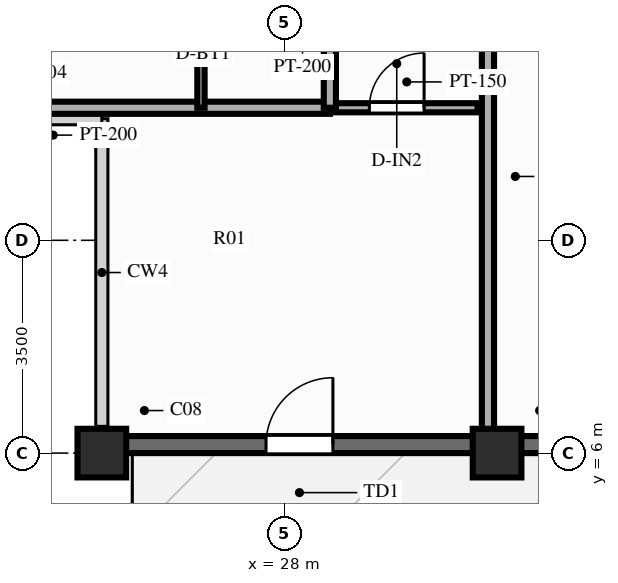
"""IFC4 building model, lengths in metres.
Left out: names, types, materials, properties, quantities, classifications, styles, units other than length and angle.
Written with IfcOpenShell. Run it as: python <this file> out.ifc"""

import sys

from ifc_helpers import new_model, si_unit, direction, frame, frame_2d, origin, origin_2d, place, context, subcontext, project, spatial, rectangle, extrude, source, transform, mapped, element, fill, save


model = new_model("IFC4")
c1 = context("Model", 3, precision=1e-05, world=origin(), true_north=direction((0.0, 1.0)))
c2 = subcontext(c1, "Body", "Model", "MODEL_VIEW")
j1 = project(units=[si_unit("LENGTHUNIT", "METRE"), si_unit("PLANEANGLEUNIT", "RADIAN")], contexts=[c1])
p1 = place(None, origin())
s1 = spatial("IfcSite", under=j1, at=p1, CompositionType="ELEMENT")
p2 = place(p1, origin())
s2 = spatial("IfcBuilding", under=s1, at=p2, CompositionType="ELEMENT")
p3 = place(p2, frame((0.0, 0.0, 196.6)))
s3 = spatial("IfcBuildingStorey", under=s2, at=p3, CompositionType="ELEMENT", Elevation=196.6)
m1 = source(origin(), c2, "Body", "SweptSolid", [
    extrude(rectangle(XDim=0.8, YDim=0.8, at=origin_2d()), origin(), (0.0, 0.0, 1.0), 3.0),
])
for number, where, z_axis, x_axis in (
    (1, (25.0, 6.0, 0.0), (0.0, 0.0, 1.0), (1.0, 0.0, 0.0)),
    (2, (31.5, 6.0, 0.0), (0.0, 0.0, 1.0), (1.0, 0.0, 0.0)),
):
    element("IfcColumn", number, at=place(p3, frame(where, z_axis=z_axis, x_axis=x_axis)), inside=s3, PredefinedType="COLUMN", context=c2, shape_type="MappedRepresentation", body=[
        mapped(m1, transform((0.0, 0.0, 0.0), scale=1.0)),
    ])
p4 = place(p3, frame((25.0, 6.14, 0.0), z_axis=(0.0, 0.0, 1.0), x_axis=(1.0, 0.0, 0.0)))
e3 = element("IfcWall", 3, at=p4, inside=s3, PredefinedType="SOLIDWALL", context=c2, shape_type="SweptSolid", body=[
    extrude(rectangle(XDim=26.0, YDim=0.28, at=frame_2d((13.0, 0.0))), origin(), (0.0, 0.0, 1.0), 2.28),
])
p5 = place(p4, frame((3.8, 0.0, 0.0), z_axis=(0.0, 0.0, 1.0), x_axis=(-1.0, 0.0, 0.0)))
e4 = element("IfcOpeningElement", 4, at=p5, cuts=e3, PredefinedType="OPENING", context=c2, shape_type="SweptSolid", body=[
    extrude(rectangle(XDim=1.1, YDim=2.15, at=frame_2d((0.55, 1.075))), frame((0.0, 0.152, 0.0), z_axis=(0.0, -1.0, 0.0), x_axis=(1.0, 0.0, 0.0)), (0.0, 0.0, 1.0), 0.304),
])
p6 = place(p4, frame((7.37, 0.0, 0.25)))
e5 = element("IfcOpeningElement", 5, at=p6, cuts=e3, PredefinedType="OPENING", context=c2, shape_type="SweptSolid", body=[
    extrude(rectangle(XDim=1.2, YDim=1.5, at=frame_2d((0.6, 0.75))), frame((0.0, 0.152, 0.0), z_axis=(0.0, -1.0, 0.0), x_axis=(1.0, 0.0, 0.0)), (0.0, 0.0, 1.0), 0.304),
])
p7 = place(p4, frame((10.5, 0.0, 0.25)))
e6 = element("IfcOpeningElement", 6, at=p7, cuts=e3, PredefinedType="OPENING", context=c2, shape_type="SweptSolid", body=[
    extrude(rectangle(XDim=1.2, YDim=1.5, at=frame_2d((0.6, 0.75))), frame((0.0, 0.152, 0.0), z_axis=(0.0, -1.0, 0.0), x_axis=(1.0, 0.0, 0.0)), (0.0, 0.0, 1.0), 0.304),
])
p8 = place(p4, frame((14.3, 0.0, 0.25)))
e7 = element("IfcOpeningElement", 7, at=p8, cuts=e3, PredefinedType="OPENING", context=c2, shape_type="SweptSolid", body=[
    extrude(rectangle(XDim=1.2, YDim=1.5, at=frame_2d((0.6, 0.75))), frame((0.0, 0.152, 0.0), z_axis=(0.0, -1.0, 0.0), x_axis=(1.0, 0.0, 0.0)), (0.0, 0.0, 1.0), 0.304),
])
p9 = place(p4, frame((17.43, 0.0, 0.25)))
e8 = element("IfcOpeningElement", 8, at=p9, cuts=e3, PredefinedType="OPENING", context=c2, shape_type="SweptSolid", body=[
    extrude(rectangle(XDim=1.2, YDim=1.5, at=frame_2d((0.6, 0.75))), frame((0.0, 0.152, 0.0), z_axis=(0.0, -1.0, 0.0), x_axis=(1.0, 0.0, 0.0)), (0.0, 0.0, 1.0), 0.304),
])
p10 = place(p4, frame((22.15, 0.0, 0.25)))
e9 = element("IfcOpeningElement", 9, at=p10, cuts=e3, PredefinedType="OPENING", context=c2, shape_type="SweptSolid", body=[
    extrude(rectangle(XDim=1.2, YDim=1.5, at=frame_2d((0.6, 0.75))), frame((0.0, 0.152, 0.0), z_axis=(0.0, -1.0, 0.0), x_axis=(1.0, 0.0, 0.0)), (0.0, 0.0, 1.0), 0.304),
])
p11 = place(p3, frame((28.85, 11.68, 0.0), z_axis=(0.0, 0.0, 1.0), x_axis=(1.0, 0.0, 0.0)))
e10 = element("IfcWall", 10, at=p11, inside=s3, PredefinedType="PARTITIONING", context=c2, shape_type="SweptSolid", body=[
    extrude(rectangle(XDim=2.33, YDim=0.15, at=frame_2d((1.165, 0.0))), origin(), (0.0, 0.0, 1.0), 2.79),
])
p12 = place(p11, frame((0.55, 0.0, 0.0)))
e11 = element("IfcOpeningElement", 11, at=p12, cuts=e10, PredefinedType="OPENING", context=c2, shape_type="SweptSolid", body=[
    extrude(rectangle(XDim=0.9, YDim=2.1, at=frame_2d((0.45, 1.05))), frame((0.0, 0.087, 0.0), z_axis=(0.0, -1.0, 0.0), x_axis=(1.0, 0.0, 0.0)), (0.0, 0.0, 1.0), 0.174),
])
p13 = place(p3, frame((31.35, 14.95, 0.0), z_axis=(0.0, 0.0, 1.0), x_axis=(0.0, -1.0, 0.0)))
e12 = element("IfcWall", 12, at=p13, inside=s3, PredefinedType="PARTITIONING", context=c2, shape_type="SweptSolid", body=[
    extrude(rectangle(XDim=8.8, YDim=0.2, at=frame_2d((4.4, 0.0))), origin(), (0.0, 0.0, 1.0), 2.39),
])
p14 = place(p3, frame((28.75, 11.68, 0.0), z_axis=(0.0, 0.0, 1.0), x_axis=(-1.0, 0.0, 0.0)))
e13 = element("IfcWall", 13, at=p14, inside=s3, PredefinedType="PARTITIONING", context=c2, shape_type="SweptSolid", body=[
    extrude(rectangle(XDim=9.1, YDim=0.2, at=frame_2d((4.55, 0.0))), origin(), (0.0, 0.0, 1.0), 2.79),
])
p15 = place(p3, frame((28.75, 11.68, 0.0), z_axis=(0.0, 0.0, 1.0), x_axis=(0.0, 1.0, 0.0)))
e14 = element("IfcWall", 14, at=p15, inside=s3, PredefinedType="PARTITIONING", context=c2, shape_type="SweptSolid", body=[
    extrude(rectangle(XDim=2.402, YDim=0.2, at=frame_2d((1.201, 0.0))), origin(), (0.0, 0.0, 1.0), 2.79),
])
p16 = place(p3, frame((26.63, 11.68, 0.0), z_axis=(0.0, 0.0, 1.0), x_axis=(0.0, 1.0, 0.0)))
e15 = element("IfcWall", 15, at=p16, inside=s3, PredefinedType="PARTITIONING", context=c2, shape_type="SweptSolid", body=[
    extrude(rectangle(XDim=2.402, YDim=0.12, at=frame_2d((1.201, 0.0))), origin(), (0.0, 0.0, 1.0), 2.79),
])
m2 = source(origin(), c2, "Body", "SweptSolid", [
    extrude(rectangle(XDim=1.1, YDim=2.15, at=frame_2d((0.55, 1.075))), frame((0.0, 0.025, 0.0), z_axis=(0.0, -1.0, 0.0), x_axis=(1.0, 0.0, 0.0)), (0.0, 0.0, 1.0), 0.05),
])
p17 = place(p5, origin())
e16 = element("IfcDoor", 16, at=p17, inside=s3, OperationType="SINGLE_SWING_LEFT", PredefinedType="DOOR", context=c2, shape_type="MappedRepresentation", body=[
    mapped(m2, transform((0.0, 0.0, 0.0), scale=1.0)),
])
fill(e4, e16)
m3 = source(origin(), c2, "Body", "SweptSolid", [
    extrude(rectangle(XDim=0.9, YDim=2.1, at=frame_2d((0.45, 1.05))), frame((0.0, 0.025, 0.0), z_axis=(0.0, -1.0, 0.0), x_axis=(1.0, 0.0, 0.0)), (0.0, 0.0, 1.0), 0.05),
])
p18 = place(p12, origin())
e17 = element("IfcDoor", 17, at=p18, inside=s3, OperationType="SINGLE_SWING_RIGHT", PredefinedType="DOOR", context=c2, shape_type="MappedRepresentation", body=[
    mapped(m3, transform((0.0, 0.0, 0.0), scale=1.0)),
])
fill(e11, e17)
save(model, sys.argv[1])
